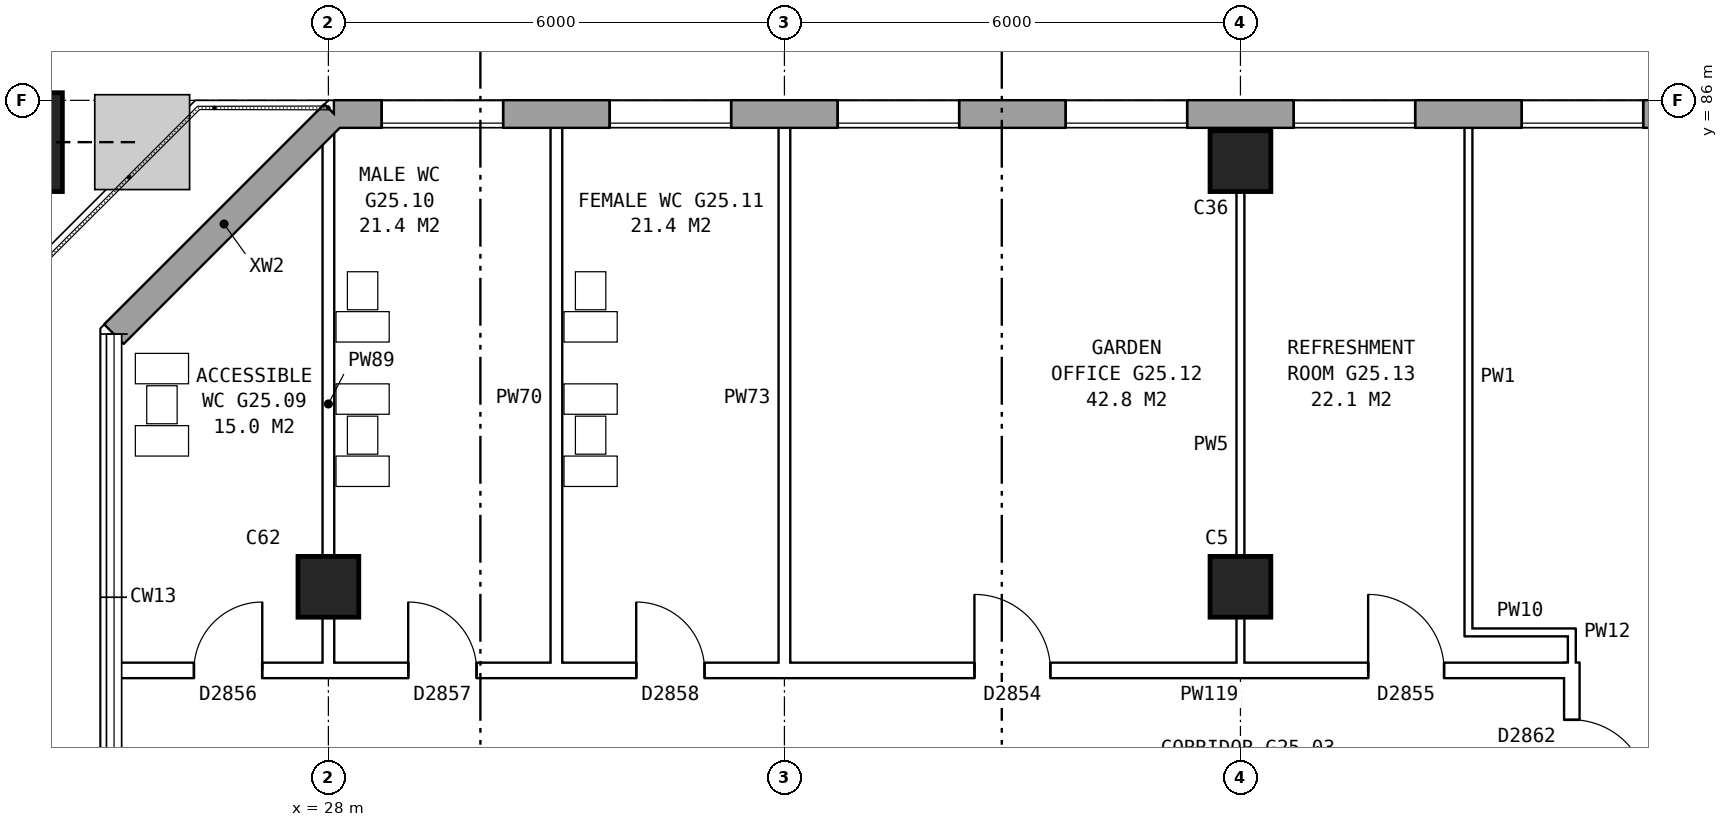
"""IFC4 building model, lengths in metres.
Left out: names, types, materials, properties, quantities, classifications, styles, units other than length and angle.
Written with IfcOpenShell. Run it as: python <this file> out.ifc"""

import sys

from ifc_helpers import new_model, si_unit, direction, frame, frame_2d, origin, origin_2d, place, context, subcontext, project, spatial, rectangle, hollow_rectangle, extrude, element, fill, save


model = new_model("IFC4")
c1 = context("Model", 3, precision=1e-05, world=origin(), true_north=direction((0.0, 1.0)))
c2 = subcontext(c1, "Body", "Model", "MODEL_VIEW")
j1 = project(units=[si_unit("LENGTHUNIT", "METRE"), si_unit("PLANEANGLEUNIT", "RADIAN")], contexts=[c1])
p1 = place(None, origin())
s1 = spatial("IfcSite", under=j1, at=p1, CompositionType="ELEMENT")
p2 = place(p1, origin())
s2 = spatial("IfcBuilding", under=s1, at=p2, CompositionType="ELEMENT")
p3 = place(p2, frame((0.0, 0.0, 90.2)))
s3 = spatial("IfcBuildingStorey", under=s2, at=p3, CompositionType="ELEMENT", Elevation=90.2)
for number, where, z_axis, x_axis in (
    (1, (28.0, 79.6, 0.0), (0.0, 0.0, 1.0), (1.0, 0.0, 0.0)),
    (2, (40.0, 79.6, 0.0), (0.0, 0.0, 1.0), (1.0, 0.0, 0.0)),
    (3, (40.0, 85.2, 0.0), (0.0, 0.0, 1.0), (1.0, 0.0, 0.0)),
):
    element("IfcColumn", number, at=place(p3, frame(where, z_axis=z_axis, x_axis=x_axis)), inside=s3, PredefinedType="COLUMN", context=c2, shape_type="SweptSolid", body=[
        extrude(rectangle(XDim=0.8, YDim=0.8, at=origin_2d()), origin(), (0.0, 0.0, 1.0), 5.6),
    ])
p4 = place(p3, frame((23.85, 85.45, 0.177), z_axis=(0.271662512341, 0.0, 0.962392580701), x_axis=(0.0, 1.0, 0.0)))
e4 = element("IfcColumn", 4, at=p4, inside=s3, PredefinedType="COLUMN", context=c2, shape_type="SweptSolid", body=[
    extrude(hollow_rectangle(XDim=1.3, YDim=1.3, WallThickness=0.07, at=origin_2d()), origin(), (0.0, 0.0, 1.0), 6.075),
])
p5 = place(p3, frame((72.925, 85.82, 0.0), z_axis=(0.0, 0.0, 1.0), x_axis=(-1.0, 0.0, 0.0)))
e5 = element("IfcWall", 5, at=p5, inside=s3, PredefinedType="STANDARD", context=c2, shape_type="SweptSolid", body=[
    extrude(rectangle(XDim=44.851, YDim=0.36, at=frame_2d((22.425, 0.0))), origin(), (0.0, 0.0, 1.0), 5.6),
])
p6 = place(p5, frame((0.625, 0.0, 0.15)))
e6 = element("IfcOpeningElement", 6, at=p6, cuts=e5, PredefinedType="OPENING", context=c2, shape_type="SweptSolid", body=[
    extrude(rectangle(XDim=1.6, YDim=2.4, at=frame_2d((0.8, 1.2))), frame((0.0, 0.19, 0.0), z_axis=(0.0, -1.0, 0.0), x_axis=(1.0, 0.0, 0.0)), (0.0, 0.0, 1.0), 0.38),
])
p7 = place(p5, frame((3.625, 0.0, 0.15)))
e7 = element("IfcOpeningElement", 7, at=p7, cuts=e5, PredefinedType="OPENING", context=c2, shape_type="SweptSolid", body=[
    extrude(rectangle(XDim=1.6, YDim=2.4, at=frame_2d((0.8, 1.2))), frame((0.0, 0.19, 0.0), z_axis=(0.0, -1.0, 0.0), x_axis=(1.0, 0.0, 0.0)), (0.0, 0.0, 1.0), 0.38),
])
p8 = place(p5, frame((6.625, 0.0, 0.15)))
e8 = element("IfcOpeningElement", 8, at=p8, cuts=e5, PredefinedType="OPENING", context=c2, shape_type="SweptSolid", body=[
    extrude(rectangle(XDim=1.6, YDim=2.4, at=frame_2d((0.8, 1.2))), frame((0.0, 0.19, 0.0), z_axis=(0.0, -1.0, 0.0), x_axis=(1.0, 0.0, 0.0)), (0.0, 0.0, 1.0), 0.38),
])
p9 = place(p5, frame((9.625, 0.0, 0.15)))
e9 = element("IfcOpeningElement", 9, at=p9, cuts=e5, PredefinedType="OPENING", context=c2, shape_type="SweptSolid", body=[
    extrude(rectangle(XDim=1.6, YDim=2.4, at=frame_2d((0.8, 1.2))), frame((0.0, 0.19, 0.0), z_axis=(0.0, -1.0, 0.0), x_axis=(1.0, 0.0, 0.0)), (0.0, 0.0, 1.0), 0.38),
])
p10 = place(p5, frame((12.625, 0.0, 0.15)))
e10 = element("IfcOpeningElement", 10, at=p10, cuts=e5, PredefinedType="OPENING", context=c2, shape_type="SweptSolid", body=[
    extrude(rectangle(XDim=1.6, YDim=2.4, at=frame_2d((0.8, 1.2))), frame((0.0, 0.19, 0.0), z_axis=(0.0, -1.0, 0.0), x_axis=(1.0, 0.0, 0.0)), (0.0, 0.0, 1.0), 0.38),
])
p11 = place(p5, frame((15.625, 0.0, 0.15)))
e11 = element("IfcOpeningElement", 11, at=p11, cuts=e5, PredefinedType="OPENING", context=c2, shape_type="SweptSolid", body=[
    extrude(rectangle(XDim=1.6, YDim=2.4, at=frame_2d((0.8, 1.2))), frame((0.0, 0.19, 0.0), z_axis=(0.0, -1.0, 0.0), x_axis=(1.0, 0.0, 0.0)), (0.0, 0.0, 1.0), 0.38),
])
p12 = place(p5, frame((18.625, 0.0, 0.15)))
e12 = element("IfcOpeningElement", 12, at=p12, cuts=e5, PredefinedType="OPENING", context=c2, shape_type="SweptSolid", body=[
    extrude(rectangle(XDim=1.6, YDim=2.4, at=frame_2d((0.8, 1.2))), frame((0.0, 0.19, 0.0), z_axis=(0.0, -1.0, 0.0), x_axis=(1.0, 0.0, 0.0)), (0.0, 0.0, 1.0), 0.38),
])
p13 = place(p5, frame((21.625, 0.0, 0.15)))
e13 = element("IfcOpeningElement", 13, at=p13, cuts=e5, PredefinedType="OPENING", context=c2, shape_type="SweptSolid", body=[
    extrude(rectangle(XDim=1.6, YDim=2.4, at=frame_2d((0.8, 1.2))), frame((0.0, 0.19, 0.0), z_axis=(0.0, -1.0, 0.0), x_axis=(1.0, 0.0, 0.0)), (0.0, 0.0, 1.0), 0.38),
])
p14 = place(p5, frame((24.625, 0.0, 0.15)))
e14 = element("IfcOpeningElement", 14, at=p14, cuts=e5, PredefinedType="OPENING", context=c2, shape_type="SweptSolid", body=[
    extrude(rectangle(XDim=1.6, YDim=2.4, at=frame_2d((0.8, 1.2))), frame((0.0, 0.19, 0.0), z_axis=(0.0, -1.0, 0.0), x_axis=(1.0, 0.0, 0.0)), (0.0, 0.0, 1.0), 0.38),
])
p15 = place(p5, frame((27.625, 0.0, 0.15)))
e15 = element("IfcOpeningElement", 15, at=p15, cuts=e5, PredefinedType="OPENING", context=c2, shape_type="SweptSolid", body=[
    extrude(rectangle(XDim=1.6, YDim=2.4, at=frame_2d((0.8, 1.2))), frame((0.0, 0.19, 0.0), z_axis=(0.0, -1.0, 0.0), x_axis=(1.0, 0.0, 0.0)), (0.0, 0.0, 1.0), 0.38),
])
p16 = place(p5, frame((30.625, 0.0, 0.15)))
e16 = element("IfcOpeningElement", 16, at=p16, cuts=e5, PredefinedType="OPENING", context=c2, shape_type="SweptSolid", body=[
    extrude(rectangle(XDim=1.6, YDim=2.4, at=frame_2d((0.8, 1.2))), frame((0.0, 0.19, 0.0), z_axis=(0.0, -1.0, 0.0), x_axis=(1.0, 0.0, 0.0)), (0.0, 0.0, 1.0), 0.38),
])
p17 = place(p5, frame((33.625, 0.0, 0.15)))
e17 = element("IfcOpeningElement", 17, at=p17, cuts=e5, PredefinedType="OPENING", context=c2, shape_type="SweptSolid", body=[
    extrude(rectangle(XDim=1.6, YDim=2.4, at=frame_2d((0.8, 1.2))), frame((0.0, 0.19, 0.0), z_axis=(0.0, -1.0, 0.0), x_axis=(1.0, 0.0, 0.0)), (0.0, 0.0, 1.0), 0.38),
])
p18 = place(p5, frame((36.625, 0.0, 0.15)))
e18 = element("IfcOpeningElement", 18, at=p18, cuts=e5, PredefinedType="OPENING", context=c2, shape_type="SweptSolid", body=[
    extrude(rectangle(XDim=1.6, YDim=2.4, at=frame_2d((0.8, 1.2))), frame((0.0, 0.19, 0.0), z_axis=(0.0, -1.0, 0.0), x_axis=(1.0, 0.0, 0.0)), (0.0, 0.0, 1.0), 0.38),
])
p19 = place(p5, frame((39.625, 0.0, 0.15)))
e19 = element("IfcOpeningElement", 19, at=p19, cuts=e5, PredefinedType="OPENING", context=c2, shape_type="SweptSolid", body=[
    extrude(rectangle(XDim=1.6, YDim=2.4, at=frame_2d((0.8, 1.2))), frame((0.0, 0.19, 0.0), z_axis=(0.0, -1.0, 0.0), x_axis=(1.0, 0.0, 0.0)), (0.0, 0.0, 1.0), 0.38),
])
p20 = place(p5, frame((42.625, 0.0, 0.15)))
e20 = element("IfcOpeningElement", 20, at=p20, cuts=e5, PredefinedType="OPENING", context=c2, shape_type="SweptSolid", body=[
    extrude(rectangle(XDim=1.6, YDim=2.4, at=frame_2d((0.8, 1.2))), frame((0.0, 0.19, 0.0), z_axis=(0.0, -1.0, 0.0), x_axis=(1.0, 0.0, 0.0)), (0.0, 0.0, 1.0), 0.38),
])
p21 = place(p3, frame((28.075, 85.82, 0.0), z_axis=(0.0, 0.0, 1.0), x_axis=(-0.707106781187, -0.707106781187, 0.0)))
e21 = element("IfcWall", 21, at=p21, inside=s3, PredefinedType="STANDARD", context=c2, shape_type="SweptSolid", body=[
    extrude(rectangle(XDim=4.094, YDim=0.36, at=frame_2d((2.047, 0.0))), origin(), (0.0, 0.0, 1.0), 5.6),
])
p22 = place(p3, frame((25.24, 78.5, 0.0), z_axis=(0.0, 0.0, 1.0), x_axis=(1.0, 0.0, 0.0)))
e22 = element("IfcWall", 22, at=p22, inside=s3, PredefinedType="PARTITIONING", context=c2, shape_type="SweptSolid", body=[
    extrude(rectangle(XDim=19.22, YDim=0.2, at=frame_2d((9.61, 0.0))), origin(), (0.0, 0.0, 1.0), 5.6),
])
p23 = place(p22, frame((0.99, 0.0, 0.0)))
e23 = element("IfcOpeningElement", 23, at=p23, cuts=e22, PredefinedType="OPENING", context=c2, shape_type="SweptSolid", body=[
    extrude(rectangle(XDim=0.9, YDim=2.1, at=frame_2d((0.45, 1.05))), frame((0.0, 0.11, 0.0), z_axis=(0.0, -1.0, 0.0), x_axis=(1.0, 0.0, 0.0)), (0.0, 0.0, 1.0), 0.22),
])
p24 = place(p22, frame((3.81, 0.0, 0.0)))
e24 = element("IfcOpeningElement", 24, at=p24, cuts=e22, PredefinedType="OPENING", context=c2, shape_type="SweptSolid", body=[
    extrude(rectangle(XDim=0.9, YDim=2.1, at=frame_2d((0.45, 1.05))), frame((0.0, 0.11, 0.0), z_axis=(0.0, -1.0, 0.0), x_axis=(1.0, 0.0, 0.0)), (0.0, 0.0, 1.0), 0.22),
])
p25 = place(p22, frame((6.81, 0.0, 0.0)))
e25 = element("IfcOpeningElement", 25, at=p25, cuts=e22, PredefinedType="OPENING", context=c2, shape_type="SweptSolid", body=[
    extrude(rectangle(XDim=0.9, YDim=2.1, at=frame_2d((0.45, 1.05))), frame((0.0, 0.11, 0.0), z_axis=(0.0, -1.0, 0.0), x_axis=(1.0, 0.0, 0.0)), (0.0, 0.0, 1.0), 0.22),
])
p26 = place(p22, frame((11.26, 0.0, 0.0)))
e26 = element("IfcOpeningElement", 26, at=p26, cuts=e22, PredefinedType="OPENING", context=c2, shape_type="SweptSolid", body=[
    extrude(rectangle(XDim=1.0, YDim=2.1, at=frame_2d((0.5, 1.05))), frame((0.0, 0.11, 0.0), z_axis=(0.0, -1.0, 0.0), x_axis=(1.0, 0.0, 0.0)), (0.0, 0.0, 1.0), 0.22),
])
p27 = place(p22, frame((16.44, 0.0, 0.0)))
e27 = element("IfcOpeningElement", 27, at=p27, cuts=e22, PredefinedType="OPENING", context=c2, shape_type="SweptSolid", body=[
    extrude(rectangle(XDim=1.0, YDim=2.1, at=frame_2d((0.5, 1.05))), frame((0.0, 0.11, 0.0), z_axis=(0.0, -1.0, 0.0), x_axis=(1.0, 0.0, 0.0)), (0.0, 0.0, 1.0), 0.22),
])
p28 = place(p3, frame((42.95, 79.0, 0.0), z_axis=(0.0, 0.0, 1.0), x_axis=(1.0, 0.0, 0.0)))
e28 = element("IfcWall", 28, at=p28, inside=s3, PredefinedType="PARTITIONING", context=c2, shape_type="SweptSolid", body=[
    extrude(rectangle(XDim=1.46, YDim=0.1, at=frame_2d((0.73, 0.0))), origin(), (0.0, 0.0, 1.0), 5.6),
])
p29 = place(p3, frame((28.0, 78.4, 0.0), z_axis=(0.0, 0.0, 1.0), x_axis=(0.0, 1.0, 0.0)))
e29 = element("IfcWall", 29, at=p29, inside=s3, PredefinedType="PLUMBINGWALL", context=c2, shape_type="SweptSolid", body=[
    extrude(rectangle(XDim=7.211, YDim=0.15, at=frame_2d((3.605, 0.0))), origin(), (0.0, 0.0, 1.0), 5.6),
])
for number, where, z_axis, x_axis in (
    (30, (31.0, 78.4, 0.0), (0.0, 0.0, 1.0), (0.0, 1.0, 0.0)),
    (31, (34.0, 78.4, 0.0), (0.0, 0.0, 1.0), (0.0, 1.0, 0.0)),
):
    element("IfcWall", number, at=place(p3, frame(where, z_axis=z_axis, x_axis=x_axis)), inside=s3, PredefinedType="PLUMBINGWALL", context=c2, shape_type="SweptSolid", body=[
        extrude(rectangle(XDim=7.36, YDim=0.15, at=frame_2d((3.68, 0.0))), origin(), (0.0, 0.0, 1.0), 5.6),
    ])
p30 = place(p3, frame((40.0, 78.4, 0.0), z_axis=(0.0, 0.0, 1.0), x_axis=(0.0, 1.0, 0.0)))
e32 = element("IfcWall", 32, at=p30, inside=s3, PredefinedType="PARTITIONING", context=c2, shape_type="SweptSolid", body=[
    extrude(rectangle(XDim=7.36, YDim=0.1, at=frame_2d((3.68, 0.0))), origin(), (0.0, 0.0, 1.0), 5.6),
])
p31 = place(p3, frame((43.0, 78.95, 0.0), z_axis=(0.0, 0.0, 1.0), x_axis=(0.0, 1.0, 0.0)))
e33 = element("IfcWall", 33, at=p31, inside=s3, PredefinedType="PARTITIONING", context=c2, shape_type="SweptSolid", body=[
    extrude(rectangle(XDim=6.81, YDim=0.1, at=frame_2d((3.405, 0.0))), origin(), (0.0, 0.0, 1.0), 5.6),
])
p32 = place(p3, frame((44.36, 76.1, 0.0), z_axis=(0.0, 0.0, 1.0), x_axis=(0.0, 1.0, 0.0)))
e34 = element("IfcWall", 34, at=p32, inside=s3, PredefinedType="PARTITIONING", context=c2, shape_type="SweptSolid", body=[
    extrude(rectangle(XDim=2.502, YDim=0.2, at=frame_2d((1.251, 0.0))), origin(), (0.0, 0.0, 1.0), 5.6),
])
p33 = place(p32, frame((0.751, 0.0, 0.0)))
e35 = element("IfcOpeningElement", 35, at=p33, cuts=e34, PredefinedType="OPENING", context=c2, shape_type="SweptSolid", body=[
    extrude(rectangle(XDim=1.0, YDim=2.1, at=frame_2d((0.5, 1.05))), frame((0.0, 0.11, 0.0), z_axis=(0.0, -1.0, 0.0), x_axis=(1.0, 0.0, 0.0)), (0.0, 0.0, 1.0), 0.22),
])
p34 = place(p3, frame((44.36, 78.398, 0.0), z_axis=(0.0, 0.0, 1.0), x_axis=(0.0, 1.0, 0.0)))
e36 = element("IfcWall", 36, at=p34, inside=s3, PredefinedType="PARTITIONING", context=c2, shape_type="SweptSolid", body=[
    extrude(rectangle(XDim=0.652, YDim=0.1, at=frame_2d((0.326, 0.0))), origin(), (0.0, 0.0, 1.0), 5.6),
])
p35 = place(p15, origin())
e37 = element("IfcWindow", 37, at=p35, inside=s3, PartitioningType="SINGLE_PANEL", PredefinedType="WINDOW", context=c2, shape_type="SweptSolid", body=[
    extrude(rectangle(XDim=1.6, YDim=2.4, at=frame_2d((0.8, 1.2))), frame((0.0, 0.15, 0.0), z_axis=(0.0, -1.0, 0.0), x_axis=(1.0, 0.0, 0.0)), (0.0, 0.0, 1.0), 0.06),
])
fill(e15, e37)
p36 = place(p16, origin())
e38 = element("IfcWindow", 38, at=p36, inside=s3, PartitioningType="SINGLE_PANEL", PredefinedType="WINDOW", context=c2, shape_type="SweptSolid", body=[
    extrude(rectangle(XDim=1.6, YDim=2.4, at=frame_2d((0.8, 1.2))), frame((0.0, 0.15, 0.0), z_axis=(0.0, -1.0, 0.0), x_axis=(1.0, 0.0, 0.0)), (0.0, 0.0, 1.0), 0.06),
])
fill(e16, e38)
p37 = place(p17, origin())
e39 = element("IfcWindow", 39, at=p37, inside=s3, PartitioningType="SINGLE_PANEL", PredefinedType="WINDOW", context=c2, shape_type="SweptSolid", body=[
    extrude(rectangle(XDim=1.6, YDim=2.4, at=frame_2d((0.8, 1.2))), frame((0.0, 0.15, 0.0), z_axis=(0.0, -1.0, 0.0), x_axis=(1.0, 0.0, 0.0)), (0.0, 0.0, 1.0), 0.06),
])
fill(e17, e39)
p38 = place(p18, origin())
e40 = element("IfcWindow", 40, at=p38, inside=s3, PartitioningType="SINGLE_PANEL", PredefinedType="WINDOW", context=c2, shape_type="SweptSolid", body=[
    extrude(rectangle(XDim=1.6, YDim=2.4, at=frame_2d((0.8, 1.2))), frame((0.0, 0.15, 0.0), z_axis=(0.0, -1.0, 0.0), x_axis=(1.0, 0.0, 0.0)), (0.0, 0.0, 1.0), 0.06),
])
fill(e18, e40)
p39 = place(p19, origin())
e41 = element("IfcWindow", 41, at=p39, inside=s3, PartitioningType="SINGLE_PANEL", PredefinedType="WINDOW", context=c2, shape_type="SweptSolid", body=[
    extrude(rectangle(XDim=1.6, YDim=2.4, at=frame_2d((0.8, 1.2))), frame((0.0, 0.15, 0.0), z_axis=(0.0, -1.0, 0.0), x_axis=(1.0, 0.0, 0.0)), (0.0, 0.0, 1.0), 0.06),
])
fill(e19, e41)
p40 = place(p20, origin())
e42 = element("IfcWindow", 42, at=p40, inside=s3, PartitioningType="SINGLE_PANEL", PredefinedType="WINDOW", context=c2, shape_type="SweptSolid", body=[
    extrude(rectangle(XDim=1.6, YDim=2.4, at=frame_2d((0.8, 1.2))), frame((0.0, 0.15, 0.0), z_axis=(0.0, -1.0, 0.0), x_axis=(1.0, 0.0, 0.0)), (0.0, 0.0, 1.0), 0.06),
])
fill(e20, e42)
p41 = place(p23, origin())
e43 = element("IfcDoor", 43, at=p41, inside=s3, OperationType="SINGLE_SWING_RIGHT", PredefinedType="DOOR", context=c2, shape_type="SweptSolid", body=[
    extrude(rectangle(XDim=0.9, YDim=2.1, at=frame_2d((0.45, 1.05))), frame((0.0, 0.025, 0.0), z_axis=(0.0, -1.0, 0.0), x_axis=(1.0, 0.0, 0.0)), (0.0, 0.0, 1.0), 0.05),
])
fill(e23, e43)
p42 = place(p24, origin())
e44 = element("IfcDoor", 44, at=p42, inside=s3, OperationType="SINGLE_SWING_LEFT", PredefinedType="DOOR", context=c2, shape_type="SweptSolid", body=[
    extrude(rectangle(XDim=0.9, YDim=2.1, at=frame_2d((0.45, 1.05))), frame((0.0, 0.025, 0.0), z_axis=(0.0, -1.0, 0.0), x_axis=(1.0, 0.0, 0.0)), (0.0, 0.0, 1.0), 0.05),
])
fill(e24, e44)
p43 = place(p25, origin())
e45 = element("IfcDoor", 45, at=p43, inside=s3, OperationType="SINGLE_SWING_LEFT", PredefinedType="DOOR", context=c2, shape_type="SweptSolid", body=[
    extrude(rectangle(XDim=0.9, YDim=2.1, at=frame_2d((0.45, 1.05))), frame((0.0, 0.025, 0.0), z_axis=(0.0, -1.0, 0.0), x_axis=(1.0, 0.0, 0.0)), (0.0, 0.0, 1.0), 0.05),
])
fill(e25, e45)
p44 = place(p26, origin())
e46 = element("IfcDoor", 46, at=p44, inside=s3, OperationType="SINGLE_SWING_LEFT", PredefinedType="DOOR", context=c2, shape_type="SweptSolid", body=[
    extrude(rectangle(XDim=1.0, YDim=2.1, at=frame_2d((0.5, 1.05))), frame((0.0, 0.025, 0.0), z_axis=(0.0, -1.0, 0.0), x_axis=(1.0, 0.0, 0.0)), (0.0, 0.0, 1.0), 0.05),
])
fill(e26, e46)
p45 = place(p27, origin())
e47 = element("IfcDoor", 47, at=p45, inside=s3, OperationType="SINGLE_SWING_LEFT", PredefinedType="DOOR", context=c2, shape_type="SweptSolid", body=[
    extrude(rectangle(XDim=1.0, YDim=2.1, at=frame_2d((0.5, 1.05))), frame((0.0, 0.025, 0.0), z_axis=(0.0, -1.0, 0.0), x_axis=(1.0, 0.0, 0.0)), (0.0, 0.0, 1.0), 0.05),
])
fill(e27, e47)
p46 = place(p33, frame((1.0, 0.0, 0.0), z_axis=(0.0, 0.0, 1.0), x_axis=(-1.0, 0.0, 0.0)))
e48 = element("IfcDoor", 48, at=p46, inside=s3, OperationType="SINGLE_SWING_RIGHT", PredefinedType="DOOR", context=c2, shape_type="SweptSolid", body=[
    extrude(rectangle(XDim=1.0, YDim=2.1, at=frame_2d((0.5, 1.05))), frame((0.0, 0.025, 0.0), z_axis=(0.0, -1.0, 0.0), x_axis=(1.0, 0.0, 0.0)), (0.0, 0.0, 1.0), 0.05),
])
fill(e35, e48)
save(model, sys.argv[1])
